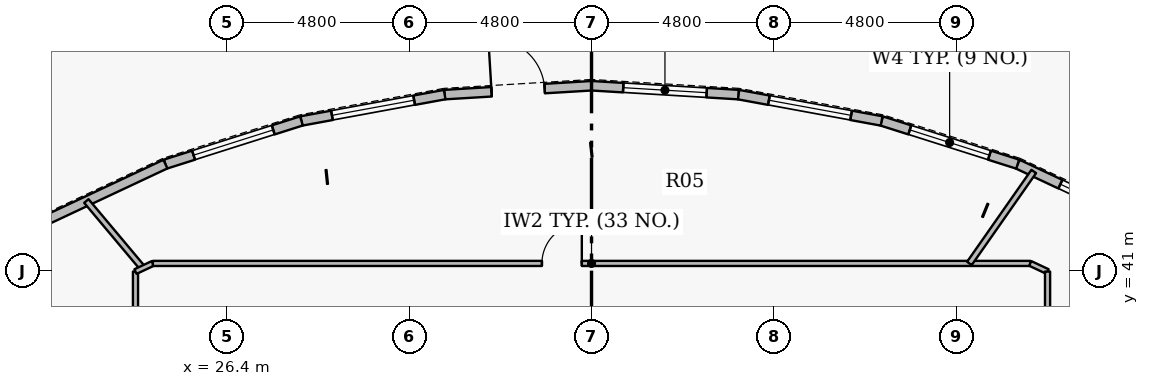
"""IFC4 building model, lengths in metres.
Left out: names, types, materials, properties, quantities, classifications, styles, units other than length and angle.
Written with IfcOpenShell. Run it as: python <this file> out.ifc"""

import sys

from ifc_helpers import new_model, si_unit, direction, frame, frame_2d, origin, origin_2d, place, context, subcontext, project, spatial, rectangle, extrude, source, transform, mapped, element, fill, save


model = new_model("IFC4")
c1 = context("Model", 3, precision=1e-05, world=origin(), true_north=direction((0.0, 1.0)))
c2 = subcontext(c1, "Body", "Model", "MODEL_VIEW")
j1 = project(units=[si_unit("LENGTHUNIT", "METRE"), si_unit("PLANEANGLEUNIT", "RADIAN")], contexts=[c1])
p1 = place(None, origin())
s1 = spatial("IfcSite", under=j1, at=p1, CompositionType="ELEMENT")
p2 = place(p1, origin())
s2 = spatial("IfcBuilding", under=s1, at=p2, CompositionType="ELEMENT")
p3 = place(p2, frame((0.0, 0.0, 27.0)))
s3 = spatial("IfcBuildingStorey", under=s2, at=p3, CompositionType="ELEMENT", Elevation=27.0)
p4 = place(p3, frame((47.214, 43.813, 0.0), z_axis=(0.0, 0.0, 1.0), x_axis=(0.905208052634, -0.424968682901, 0.0)))
e1 = element("IfcWall", 1, at=p4, inside=s3, PredefinedType="SOLIDWALL", context=c2, shape_type="SweptSolid", body=[
    extrude(rectangle(XDim=3.649, YDim=0.25, at=frame_2d((1.824, 0.0))), origin(), (0.0, 0.0, 1.0), 3.185),
])
p5 = place(p4, frame((1.241, 0.0, 0.9)))
e2 = element("IfcOpeningElement", 2, at=p5, cuts=e1, PredefinedType="OPENING", context=c2, shape_type="SweptSolid", body=[
    extrude(rectangle(XDim=1.6, YDim=1.75, at=origin_2d()), frame((0.8, 0.135, 0.875), z_axis=(0.0, -1.0, 0.0), x_axis=(1.0, 0.0, 0.0)), (0.0, 0.0, 1.0), 0.27),
])
p6 = place(p3, frame((43.634, 44.949, 0.0), z_axis=(0.0, 0.0, 1.0), x_axis=(0.953166212936, -0.302446971412, 0.0)))
e3 = element("IfcWall", 3, at=p6, inside=s3, PredefinedType="SOLIDWALL", context=c2, shape_type="SweptSolid", body=[
    extrude(rectangle(XDim=3.756, YDim=0.25, at=frame_2d((1.878, 0.0))), origin(), (0.0, 0.0, 1.0), 3.185),
])
p7 = place(p6, frame((0.778, 0.0, 0.9)))
e4 = element("IfcOpeningElement", 4, at=p7, cuts=e3, PredefinedType="OPENING", context=c2, shape_type="SweptSolid", body=[
    extrude(rectangle(XDim=2.2, YDim=2.0, at=origin_2d()), frame((1.1, 0.135, 1.0), z_axis=(0.0, -1.0, 0.0), x_axis=(1.0, 0.0, 0.0)), (0.0, 0.0, 1.0), 0.27),
])
p8 = place(p3, frame((39.865, 45.642, 0.0), z_axis=(0.0, 0.0, 1.0), x_axis=(0.983496768781, -0.180925691368, 0.0)))
e5 = element("IfcWall", 5, at=p8, inside=s3, PredefinedType="SOLIDWALL", context=c2, shape_type="SweptSolid", body=[
    extrude(rectangle(XDim=3.832, YDim=0.25, at=frame_2d((1.916, 0.0))), origin(), (0.0, 0.0, 1.0), 5.15),
])
p9 = place(p8, frame((0.816, 0.0, 0.9)))
e6 = element("IfcOpeningElement", 6, at=p9, cuts=e5, PredefinedType="OPENING", context=c2, shape_type="SweptSolid", body=[
    extrude(rectangle(XDim=2.2, YDim=2.0, at=origin_2d()), frame((1.1, 0.135, 1.0), z_axis=(0.0, -1.0, 0.0), x_axis=(1.0, 0.0, 0.0)), (0.0, 0.0, 1.0), 0.27),
])
p10 = place(p3, frame((36.0, 45.875, 0.0), z_axis=(0.0, 0.0, 1.0), x_axis=(0.998188749064, -0.060159963776, 0.0)))
e7 = element("IfcWall", 7, at=p10, inside=s3, PredefinedType="SOLIDWALL", context=c2, shape_type="SweptSolid", body=[
    extrude(rectangle(XDim=3.872, YDim=0.25, at=frame_2d((1.936, 0.0))), origin(), (0.0, 0.0, 1.0), 3.185),
])
p11 = place(p10, frame((0.836, 0.0, 0.9)))
e8 = element("IfcOpeningElement", 8, at=p11, cuts=e7, PredefinedType="OPENING", context=c2, shape_type="SweptSolid", body=[
    extrude(rectangle(XDim=2.2, YDim=2.0, at=origin_2d()), frame((1.1, 0.135, 1.0), z_axis=(0.0, -1.0, 0.0), x_axis=(1.0, 0.0, 0.0)), (0.0, 0.0, 1.0), 0.27),
])
p12 = place(p3, frame((32.135, 45.642, 0.0), z_axis=(0.0, 0.0, 1.0), x_axis=(0.998188749064, 0.060159963776, 0.0)))
e9 = element("IfcWall", 9, at=p12, inside=s3, PredefinedType="SOLIDWALL", context=c2, shape_type="SweptSolid", body=[
    extrude(rectangle(XDim=3.872, YDim=0.25, at=frame_2d((1.936, 0.0))), origin(), (0.0, 0.0, 1.0), 3.185),
])
p13 = place(p12, frame((1.236, 0.0, 0.0)))
e10 = element("IfcOpeningElement", 10, at=p13, cuts=e9, PredefinedType="OPENING", context=c2, shape_type="SweptSolid", body=[
    extrude(rectangle(XDim=1.4, YDim=2.2, at=origin_2d()), frame((0.7, 0.135, 1.1), z_axis=(0.0, -1.0, 0.0), x_axis=(1.0, 0.0, 0.0)), (0.0, 0.0, 1.0), 0.27),
])
p14 = place(p3, frame((28.366, 44.949, 0.0), z_axis=(0.0, 0.0, 1.0), x_axis=(0.983496768781, 0.180925691368, 0.0)))
e11 = element("IfcWall", 11, at=p14, inside=s3, PredefinedType="SOLIDWALL", context=c2, shape_type="SweptSolid", body=[
    extrude(rectangle(XDim=3.832, YDim=0.25, at=frame_2d((1.916, 0.0))), origin(), (0.0, 0.0, 1.0), 3.185),
])
p15 = place(p14, frame((0.816, 0.0, 0.9)))
e12 = element("IfcOpeningElement", 12, at=p15, cuts=e11, PredefinedType="OPENING", context=c2, shape_type="SweptSolid", body=[
    extrude(rectangle(XDim=2.2, YDim=2.0, at=origin_2d()), frame((1.1, 0.135, 1.0), z_axis=(0.0, -1.0, 0.0), x_axis=(1.0, 0.0, 0.0)), (0.0, 0.0, 1.0), 0.27),
])
p16 = place(p3, frame((24.786, 43.813, 0.0), z_axis=(0.0, 0.0, 1.0), x_axis=(0.953166212936, 0.302446971412, 0.0)))
e13 = element("IfcWall", 13, at=p16, inside=s3, PredefinedType="SOLIDWALL", context=c2, shape_type="SweptSolid", body=[
    extrude(rectangle(XDim=3.756, YDim=0.25, at=frame_2d((1.878, 0.0))), origin(), (0.0, 0.0, 1.0), 3.185),
])
p17 = place(p16, frame((0.778, 0.0, 0.9)))
e14 = element("IfcOpeningElement", 14, at=p17, cuts=e13, PredefinedType="OPENING", context=c2, shape_type="SweptSolid", body=[
    extrude(rectangle(XDim=2.2, YDim=2.0, at=origin_2d()), frame((1.1, 0.135, 1.0), z_axis=(0.0, -1.0, 0.0), x_axis=(1.0, 0.0, 0.0)), (0.0, 0.0, 1.0), 0.27),
])
p18 = place(p3, frame((21.484, 42.262, 0.0), z_axis=(0.0, 0.0, 1.0), x_axis=(0.905208052634, 0.424968682901, 0.0)))
e15 = element("IfcWall", 15, at=p18, inside=s3, PredefinedType="SOLIDWALL", context=c2, shape_type="SweptSolid", body=[
    extrude(rectangle(XDim=3.649, YDim=0.25, at=frame_2d((1.824, 0.0))), origin(), (0.0, 0.0, 1.0), 5.15),
])
p19 = place(p3, frame((22.707, 42.842, 0.0), z_axis=(0.0, 0.0, 1.0), x_axis=(0.642762571273, -0.766065452145, 0.0)))
e16 = element("IfcWall", 16, at=p19, inside=s3, PredefinedType="PARTITIONING", context=c2, shape_type="SweptSolid", body=[
    extrude(rectangle(XDim=2.307, YDim=0.15, at=frame_2d((1.153, 0.0))), origin(), (0.0, 0.0, 1.0), 5.15),
])
p20 = place(p3, frame((24.0, 33.01, 0.0), z_axis=(0.0, 0.0, 1.0), x_axis=(0.0, 1.0, 0.0)))
e17 = element("IfcWall", 17, at=p20, inside=s3, PredefinedType="PARTITIONING", context=c2, shape_type="SweptSolid", body=[
    extrude(rectangle(XDim=7.976, YDim=0.135, at=frame_2d((3.988, 0.0))), origin(), (0.0, 0.0, 1.0), 3.185),
])
p21 = place(p20, frame((3.463, 0.0, 0.0)))
e18 = element("IfcOpeningElement", 18, at=p21, cuts=e17, PredefinedType="OPENING", context=c2, shape_type="SweptSolid", body=[
    extrude(rectangle(XDim=1.05, YDim=2.15, at=origin_2d()), frame((0.525, 0.078, 1.075), z_axis=(0.0, -1.0, 0.0), x_axis=(1.0, 0.0, 0.0)), (0.0, 0.0, 1.0), 0.155),
])
p22 = place(p3, frame((24.0, 40.986, 0.0), z_axis=(0.0, 0.0, 1.0), x_axis=(0.905313139204, 0.424744770404, 0.0)))
e19 = element("IfcWall", 19, at=p22, inside=s3, PredefinedType="PARTITIONING", context=c2, shape_type="SweptSolid", body=[
    extrude(rectangle(XDim=0.503, YDim=0.135, at=frame_2d((0.251, 0.0))), origin(), (0.0, 0.0, 1.0), 5.15),
])
p23 = place(p3, frame((24.456, 41.2, 0.0), z_axis=(0.0, 0.0, 1.0), x_axis=(1.0, 0.0, 0.0)))
e20 = element("IfcWall", 20, at=p23, inside=s3, PredefinedType="PARTITIONING", context=c2, shape_type="SweptSolid", body=[
    extrude(rectangle(XDim=23.087, YDim=0.135, at=frame_2d((11.544, 0.0))), origin(), (0.0, 0.0, 1.0), 3.185),
])
p24 = place(p23, frame((10.238, 0.0, 0.0)))
e21 = element("IfcOpeningElement", 21, at=p24, cuts=e20, PredefinedType="OPENING", context=c2, shape_type="SweptSolid", body=[
    extrude(rectangle(XDim=1.05, YDim=2.15, at=origin_2d()), frame((0.525, 0.078, 1.075), z_axis=(0.0, -1.0, 0.0), x_axis=(1.0, 0.0, 0.0)), (0.0, 0.0, 1.0), 0.155),
])
p25 = place(p3, frame((45.943, 41.2, 0.0), z_axis=(0.0, 0.0, 1.0), x_axis=(0.573573291264, 0.819154246494, 0.0)))
e22 = element("IfcWall", 22, at=p25, inside=s3, PredefinedType="PARTITIONING", context=c2, shape_type="SweptSolid", body=[
    extrude(rectangle(XDim=2.954, YDim=0.15, at=frame_2d((1.477, 0.0))), origin(), (0.0, 0.0, 1.0), 4.635),
])
p26 = place(p3, frame((47.544, 41.2, 0.0), z_axis=(0.0, 0.0, 1.0), x_axis=(0.90529016823, -0.42479372795, 0.0)))
e23 = element("IfcWall", 23, at=p26, inside=s3, PredefinedType="PARTITIONING", context=c2, shape_type="SweptSolid", body=[
    extrude(rectangle(XDim=0.504, YDim=0.135, at=frame_2d((0.252, 0.0))), origin(), (0.0, 0.0, 1.0), 5.15),
])
p27 = place(p3, frame((48.0, 26.43, 0.0), z_axis=(0.0, 0.0, 1.0), x_axis=(0.0, 1.0, 0.0)))
e24 = element("IfcWall", 24, at=p27, inside=s3, PredefinedType="PARTITIONING", context=c2, shape_type="SweptSolid", body=[
    extrude(rectangle(XDim=14.556, YDim=0.135, at=frame_2d((7.278, 0.0))), origin(), (0.0, 0.0, 1.0), 3.185),
])
p28 = place(p27, frame((6.753, 0.0, 0.0)))
e25 = element("IfcOpeningElement", 25, at=p28, cuts=e24, PredefinedType="OPENING", context=c2, shape_type="SweptSolid", body=[
    extrude(rectangle(XDim=1.05, YDim=2.15, at=origin_2d()), frame((0.525, 0.078, 1.075), z_axis=(0.0, -1.0, 0.0), x_axis=(1.0, 0.0, 0.0)), (0.0, 0.0, 1.0), 0.155),
])
m1 = source(origin(), c2, "Body", "SweptSolid", [
    extrude(rectangle(XDim=1.6, YDim=1.75, at=origin_2d()), frame((0.8, 0.03, 0.875), z_axis=(0.0, -1.0, 0.0), x_axis=(1.0, 0.0, 0.0)), (0.0, 0.0, 1.0), 0.06),
])
p29 = place(p5, origin())
e26 = element("IfcWindow", 26, at=p29, inside=s3, PartitioningType="DOUBLE_PANEL_VERTICAL", PredefinedType="WINDOW", context=c2, shape_type="MappedRepresentation", body=[
    mapped(m1, transform((0.0, 0.0, 0.0), x_axis=(1.0, 0.0, 0.0), y_axis=(0.0, 1.0, 0.0), z_axis=(0.0, 0.0, 1.0), scale=1.0)),
])
fill(e2, e26)
m2 = source(origin(), c2, "Body", "SweptSolid", [
    extrude(rectangle(XDim=2.2, YDim=2.0, at=origin_2d()), frame((1.1, 0.03, 1.0), z_axis=(0.0, -1.0, 0.0), x_axis=(1.0, 0.0, 0.0)), (0.0, 0.0, 1.0), 0.06),
])
p30 = place(p7, origin())
e27 = element("IfcWindow", 27, at=p30, inside=s3, PartitioningType="TRIPLE_PANEL_VERTICAL", PredefinedType="WINDOW", context=c2, shape_type="MappedRepresentation", body=[
    mapped(m2, transform((0.0, 0.0, 0.0), x_axis=(1.0, 0.0, 0.0), y_axis=(0.0, 1.0, 0.0), z_axis=(0.0, 0.0, 1.0), scale=1.0)),
])
fill(e4, e27)
p31 = place(p9, origin())
e28 = element("IfcWindow", 28, at=p31, inside=s3, PartitioningType="TRIPLE_PANEL_VERTICAL", PredefinedType="WINDOW", context=c2, shape_type="MappedRepresentation", body=[
    mapped(m2, transform((0.0, 0.0, 0.0), x_axis=(1.0, 0.0, 0.0), y_axis=(0.0, 1.0, 0.0), z_axis=(0.0, 0.0, 1.0), scale=1.0)),
])
fill(e6, e28)
p32 = place(p11, origin())
e29 = element("IfcWindow", 29, at=p32, inside=s3, PartitioningType="TRIPLE_PANEL_VERTICAL", PredefinedType="WINDOW", context=c2, shape_type="MappedRepresentation", body=[
    mapped(m2, transform((0.0, 0.0, 0.0), x_axis=(1.0, 0.0, 0.0), y_axis=(0.0, 1.0, 0.0), z_axis=(0.0, 0.0, 1.0), scale=1.0)),
])
fill(e8, e29)
m3 = source(origin(), c2, "Body", "SweptSolid", [
    extrude(rectangle(XDim=1.4, YDim=2.2, at=origin_2d()), frame((0.7, 0.025, 1.1), z_axis=(0.0, -1.0, 0.0), x_axis=(1.0, 0.0, 0.0)), (0.0, 0.0, 1.0), 0.05),
])
p33 = place(p13, origin())
e30 = element("IfcDoor", 30, at=p33, inside=s3, OperationType="SINGLE_SWING_LEFT", PredefinedType="DOOR", context=c2, shape_type="MappedRepresentation", body=[
    mapped(m3, transform((0.0, 0.0, 0.0), x_axis=(1.0, 0.0, 0.0), y_axis=(0.0, 1.0, 0.0), z_axis=(0.0, 0.0, 1.0), scale=1.0)),
])
fill(e10, e30)
p34 = place(p15, origin())
e31 = element("IfcWindow", 31, at=p34, inside=s3, PartitioningType="TRIPLE_PANEL_VERTICAL", PredefinedType="WINDOW", context=c2, shape_type="MappedRepresentation", body=[
    mapped(m2, transform((0.0, 0.0, 0.0), x_axis=(1.0, 0.0, 0.0), y_axis=(0.0, 1.0, 0.0), z_axis=(0.0, 0.0, 1.0), scale=1.0)),
])
fill(e12, e31)
p35 = place(p17, origin())
e32 = element("IfcWindow", 32, at=p35, inside=s3, PartitioningType="TRIPLE_PANEL_VERTICAL", PredefinedType="WINDOW", context=c2, shape_type="MappedRepresentation", body=[
    mapped(m2, transform((0.0, 0.0, 0.0), x_axis=(1.0, 0.0, 0.0), y_axis=(0.0, 1.0, 0.0), z_axis=(0.0, 0.0, 1.0), scale=1.0)),
])
fill(e14, e32)
m4 = source(origin(), c2, "Body", "SweptSolid", [
    extrude(rectangle(XDim=1.05, YDim=2.15, at=origin_2d()), frame((0.525, 0.025, 1.075), z_axis=(0.0, -1.0, 0.0), x_axis=(1.0, 0.0, 0.0)), (0.0, 0.0, 1.0), 0.05),
])
p36 = place(p24, origin())
e33 = element("IfcDoor", 33, at=p36, inside=s3, OperationType="SINGLE_SWING_RIGHT", PredefinedType="DOOR", context=c2, shape_type="MappedRepresentation", body=[
    mapped(m4, transform((0.0, 0.0, 0.0), x_axis=(1.0, 0.0, 0.0), y_axis=(0.0, 1.0, 0.0), z_axis=(0.0, 0.0, 1.0), scale=1.0)),
])
fill(e21, e33)
save(model, sys.argv[1])
